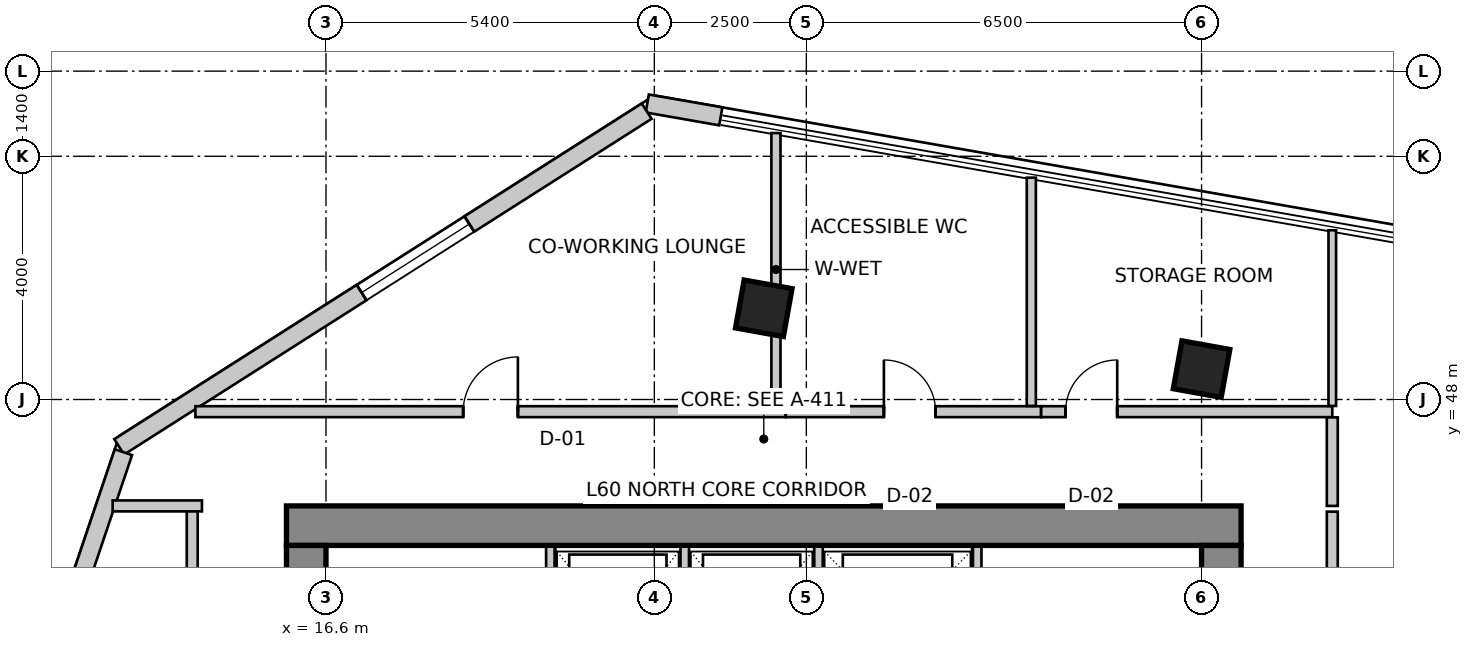
"""IFC4 building model, lengths in metres.
Left out: names, types, materials, properties, quantities, classifications, styles, units other than length and angle.
Written with IfcOpenShell. Run it as: python <this file> out.ifc"""

import sys

from ifc_helpers import new_model, si_unit, direction, frame, frame_2d, origin, origin_2d, place, context, subcontext, project, spatial, rectangle, extrude, source, transform, mapped, element, fill, save


model = new_model("IFC4")
c1 = context("Model", 3, precision=1e-05, world=origin(), true_north=direction((0.0, 1.0)))
c2 = subcontext(c1, "Body", "Model", "MODEL_VIEW")
j1 = project(units=[si_unit("LENGTHUNIT", "METRE"), si_unit("PLANEANGLEUNIT", "RADIAN")], contexts=[c1])
p1 = place(None, origin())
s1 = spatial("IfcSite", under=j1, at=p1, CompositionType="ELEMENT")
p2 = place(p1, origin())
s2 = spatial("IfcBuilding", under=s1, at=p2, CompositionType="ELEMENT")
p3 = place(p2, frame((0.0, 0.0, 235.9)))
s3 = spatial("IfcBuildingStorey", under=s2, at=p3, CompositionType="ELEMENT", Elevation=235.9)
p4 = place(p3, frame((15.95, 45.925, 0.0), z_axis=(0.0, 0.0, 1.0), x_axis=(1.0, 0.0, 0.0)))
e1 = element("IfcWall", 1, at=p4, inside=s3, PredefinedType="SHEAR", context=c2, shape_type="SweptSolid", body=[
    extrude(rectangle(XDim=15.7, YDim=0.65, at=frame_2d((7.85, 0.0))), origin(), (0.0, 0.0, 1.0), 3.5),
])
p5 = place(p3, frame((16.275, 34.2, 0.0), z_axis=(0.0, 0.0, 1.0), x_axis=(0.0, 1.0, 0.0)))
e2 = element("IfcWall", 2, at=p5, inside=s3, PredefinedType="SHEAR", context=c2, shape_type="SweptSolid", body=[
    extrude(rectangle(XDim=11.4, YDim=0.65, at=frame_2d((5.7, 0.0))), origin(), (0.0, 0.0, 1.0), 3.5),
])
m1 = source(origin(), c2, "Body", "SweptSolid", [
    extrude(rectangle(XDim=1.1, YDim=2.15, at=frame_2d((0.55, 1.075))), frame((0.0, 0.335, 0.0), z_axis=(0.0, -1.0, 0.0), x_axis=(1.0, 0.0, 0.0)), (0.0, 0.0, 1.0), 0.67),
])
p6 = place(p5, frame((7.15, 0.0, 0.0)))
e3 = element("IfcOpeningElement", 3, at=p6, cuts=e2, PredefinedType="OPENING", context=c2, shape_type="MappedRepresentation", body=[
    mapped(m1, transform((0.0, 0.0, 0.0), scale=1.0)),
])
p7 = place(p3, frame((31.325, 34.2, 0.0), z_axis=(0.0, 0.0, 1.0), x_axis=(0.0, 1.0, 0.0)))
e4 = element("IfcWall", 4, at=p7, inside=s3, PredefinedType="SHEAR", context=c2, shape_type="SweptSolid", body=[
    extrude(rectangle(XDim=11.4, YDim=0.65, at=frame_2d((5.7, 0.0))), origin(), (0.0, 0.0, 1.0), 3.5),
])
p8 = place(p7, frame((7.35, 0.0, 0.0)))
e5 = element("IfcOpeningElement", 5, at=p8, cuts=e4, PredefinedType="OPENING", context=c2, shape_type="MappedRepresentation", body=[
    mapped(m1, transform((0.0, 0.0, 0.0), scale=1.0)),
])
m2 = source(origin(), c2, "Body", "SweptSolid", [
    extrude(rectangle(XDim=0.8, YDim=0.8, at=origin_2d()), origin(), (0.0, 0.0, 1.0), 3.5),
])
for number, where, z_axis, x_axis in (
    (6, (23.8, 49.5, 0.0), (0.0, 0.0, 1.0), (0.984, -0.177, 0.0)),
    (7, (31.0, 48.5, 0.0), (0.0, 0.0, 1.0), (0.984, -0.177, 0.0)),
):
    element("IfcColumn", number, at=place(p3, frame(where, z_axis=z_axis, x_axis=x_axis)), inside=s3, PredefinedType="COLUMN", context=c2, shape_type="MappedRepresentation", body=[
        mapped(m2, transform((0.0, 0.0, 0.0), scale=1.0)),
    ])
p9 = place(p3, frame((23.093, 52.657, 0.0), z_axis=(0.0, 0.0, 1.0), x_axis=(-0.985090351288, 0.172037785961, 0.0)))
e8 = element("IfcWall", 8, at=p9, inside=s3, PredefinedType="SOLIDWALL", context=c2, shape_type="SweptSolid", body=[
    extrude(rectangle(XDim=1.228, YDim=0.3, at=frame_2d((0.614, 0.0))), origin(), (0.0, 0.0, 1.0), 3.25),
])
p10 = place(p3, frame((21.874, 52.742, 0.0), z_axis=(0.0, 0.0, 1.0), x_axis=(-0.84365659959, -0.536883173482, 0.0)))
e9 = element("IfcWall", 9, at=p10, inside=s3, PredefinedType="SOLIDWALL", context=c2, shape_type="SweptSolid", body=[
    extrude(rectangle(XDim=10.283, YDim=0.3, at=frame_2d((5.142, 0.0))), origin(), (0.0, 0.0, 1.0), 3.25),
])
m3 = source(origin(), c2, "Body", "SweptSolid", [
    extrude(rectangle(XDim=2.1, YDim=2.0, at=frame_2d((1.05, 1.0))), frame((0.0, 0.16, 0.0), z_axis=(0.0, -1.0, 0.0), x_axis=(1.0, 0.0, 0.0)), (0.0, 0.0, 1.0), 0.32),
])
p11 = place(p10, frame((3.457, 0.0, 0.85)))
e10 = element("IfcOpeningElement", 10, at=p11, cuts=e9, PredefinedType="OPENING", context=c2, shape_type="MappedRepresentation", body=[
    mapped(m3, transform((0.0, 0.0, 0.0), scale=1.0)),
])
p12 = place(p3, frame((13.269, 47.134, 0.0), z_axis=(0.0, 0.0, 1.0), x_axis=(-0.319920776449, -0.947444297464, 0.0)))
e11 = element("IfcWall", 11, at=p12, inside=s3, PredefinedType="SOLIDWALL", context=c2, shape_type="SweptSolid", body=[
    extrude(rectangle(XDim=16.133, YDim=0.3, at=frame_2d((8.067, 0.0))), origin(), (0.0, 0.0, 1.0), 3.25),
])
m4 = source(origin(), c2, "Body", "SweptSolid", [
    extrude(rectangle(XDim=2.4, YDim=2.2, at=frame_2d((1.2, 1.1))), frame((0.0, 0.16, 0.0), z_axis=(0.0, -1.0, 0.0), x_axis=(1.0, 0.0, 0.0)), (0.0, 0.0, 1.0), 0.32),
])
p13 = place(p12, frame((2.363, 0.0, 0.85)))
e12 = element("IfcOpeningElement", 12, at=p13, cuts=e11, PredefinedType="OPENING", context=c2, shape_type="MappedRepresentation", body=[
    mapped(m4, transform((0.0, 0.0, 0.0), scale=1.0)),
])
p14 = place(p12, frame((7.41, 0.0, 0.85)))
e13 = element("IfcOpeningElement", 13, at=p14, cuts=e11, PredefinedType="OPENING", context=c2, shape_type="MappedRepresentation", body=[
    mapped(m3, transform((0.0, 0.0, 0.0), scale=1.0)),
])
p15 = place(p12, frame((12.157, 0.0, 0.85)))
e14 = element("IfcOpeningElement", 14, at=p15, cuts=e11, PredefinedType="OPENING", context=c2, shape_type="MappedRepresentation", body=[
    mapped(m4, transform((0.0, 0.0, 0.0), scale=1.0)),
])
for number, where, z_axis, x_axis in (
    (15, (20.29, 43.28, 0.0), (0.0, 0.0, 1.0), (0.0, 1.0, 0.0)),
    (16, (27.31, 43.28, 0.0), (0.0, 0.0, 1.0), (0.0, 1.0, 0.0)),
):
    element("IfcWall", number, at=place(p3, frame(where, z_axis=z_axis, x_axis=x_axis)), inside=s3, PredefinedType="SOLIDWALL", context=c2, shape_type="SweptSolid", body=[
        extrude(rectangle(XDim=2.3, YDim=0.14, at=frame_2d((1.15, 0.0))), origin(), (0.0, 0.0, 1.0), 3.25),
    ])
for number, where, z_axis, x_axis in (
    (17, (22.5, 43.02, 0.0), (0.0, 0.0, 1.0), (0.0, 1.0, 0.0)),
    (18, (24.7, 43.02, 0.0), (0.0, 0.0, 1.0), (0.0, 1.0, 0.0)),
):
    element("IfcWall", number, at=place(p3, frame(where, z_axis=z_axis, x_axis=x_axis)), inside=s3, PredefinedType="SOLIDWALL", context=c2, shape_type="SweptSolid", body=[
        extrude(rectangle(XDim=2.56, YDim=0.14, at=frame_2d((1.28, 0.0))), origin(), (0.0, 0.0, 1.0), 3.25),
    ])
p16 = place(p3, frame((14.4, 33.644, 0.0), z_axis=(0.0, 0.0, 1.0), x_axis=(0.0, 1.0, 0.0)))
e19 = element("IfcWall", 19, at=p16, inside=s3, PredefinedType="PARTITIONING", context=c2, shape_type="SweptSolid", body=[
    extrude(rectangle(XDim=12.606, YDim=0.18, at=frame_2d((6.303, 0.0))), origin(), (0.0, 0.0, 1.0), 3.25),
])
m5 = source(origin(), c2, "Body", "SweptSolid", [
    extrude(rectangle(XDim=0.9, YDim=2.15, at=frame_2d((0.45, 1.075))), frame((0.0, 0.1, 0.0), z_axis=(0.0, -1.0, 0.0), x_axis=(1.0, 0.0, 0.0)), (0.0, 0.0, 1.0), 0.2),
])
p17 = place(p16, frame((4.399, 0.0, 0.0)))
e20 = element("IfcOpeningElement", 20, at=p17, cuts=e19, PredefinedType="OPENING", context=c2, shape_type="MappedRepresentation", body=[
    mapped(m5, transform((0.0, 0.0, 0.0), scale=1.0)),
])
p18 = place(p3, frame((14.56, 46.25, 0.0), z_axis=(0.0, 0.0, 1.0), x_axis=(-1.0, 0.0, 0.0)))
e21 = element("IfcWall", 21, at=p18, inside=s3, PredefinedType="PARTITIONING", context=c2, shape_type="SweptSolid", body=[
    extrude(rectangle(XDim=1.469, YDim=0.18, at=frame_2d((0.734, 0.0))), origin(), (0.0, 0.0, 1.0), 3.25),
])
p19 = place(p3, frame((14.453, 47.8, 0.0), z_axis=(0.0, 0.0, 1.0), x_axis=(1.0, 0.0, 0.0)))
e22 = element("IfcWall", 22, at=p19, inside=s3, PredefinedType="PARTITIONING", context=c2, shape_type="SweptSolid", body=[
    extrude(rectangle(XDim=9.707, YDim=0.18, at=frame_2d((4.854, 0.0))), origin(), (0.0, 0.0, 1.0), 2.835),
])
p20 = place(p19, frame((4.404, 0.0, 0.0)))
e23 = element("IfcOpeningElement", 23, at=p20, cuts=e22, PredefinedType="OPENING", context=c2, shape_type="MappedRepresentation", body=[
    mapped(m5, transform((0.0, 0.0, 0.0), scale=1.0)),
])
p21 = place(p3, frame((24.162, 47.8, 0.0), z_axis=(0.0, 0.0, 1.0), x_axis=(1.0, 0.0, 0.0)))
e24 = element("IfcWall", 24, at=p21, inside=s3, PredefinedType="PARTITIONING", context=c2, shape_type="SweptSolid", body=[
    extrude(rectangle(XDim=4.198, YDim=0.18, at=frame_2d((2.099, 0.0))), origin(), (0.0, 0.0, 1.0), 3.25),
])
m6 = source(origin(), c2, "Body", "SweptSolid", [
    extrude(rectangle(XDim=0.85, YDim=2.15, at=frame_2d((0.425, 1.075))), frame((0.0, 0.1, 0.0), z_axis=(0.0, -1.0, 0.0), x_axis=(1.0, 0.0, 0.0)), (0.0, 0.0, 1.0), 0.2),
])
p22 = place(p21, frame((1.613, 0.0, 0.0)))
e25 = element("IfcOpeningElement", 25, at=p22, cuts=e24, PredefinedType="OPENING", context=c2, shape_type="MappedRepresentation", body=[
    mapped(m6, transform((0.0, 0.0, 0.0), scale=1.0)),
])
p23 = place(p3, frame((28.362, 47.8, 0.0), z_axis=(0.0, 0.0, 1.0), x_axis=(1.0, 0.0, 0.0)))
e26 = element("IfcWall", 26, at=p23, inside=s3, PredefinedType="PARTITIONING", context=c2, shape_type="SweptSolid", body=[
    extrude(rectangle(XDim=4.788, YDim=0.18, at=frame_2d((2.394, 0.0))), origin(), (0.0, 0.0, 1.0), 2.688),
])
p24 = place(p23, frame((0.401, 0.0, 0.0)))
e27 = element("IfcOpeningElement", 27, at=p24, cuts=e26, PredefinedType="OPENING", context=c2, shape_type="MappedRepresentation", body=[
    mapped(m6, transform((0.0, 0.0, 0.0), scale=1.0)),
])
p25 = place(p3, frame((33.15, 47.706, 0.0), z_axis=(0.0, 0.0, 1.0), x_axis=(0.0, -1.0, 0.0)))
e28 = element("IfcWall", 28, at=p25, inside=s3, PredefinedType="PARTITIONING", context=c2, shape_type="SweptSolid", body=[
    extrude(rectangle(XDim=1.456, YDim=0.18, at=frame_2d((0.728, 0.0))), origin(), (0.0, 0.0, 1.0), 2.835),
])
p26 = place(p3, frame((33.15, 46.156, 0.0), z_axis=(0.0, 0.0, 1.0), x_axis=(0.0, -1.0, 0.0)))
e29 = element("IfcWall", 29, at=p26, inside=s3, PredefinedType="PARTITIONING", context=c2, shape_type="SweptSolid", body=[
    extrude(rectangle(XDim=6.316, YDim=0.18, at=frame_2d((3.158, 0.0))), origin(), (0.0, 0.0, 1.0), 2.688),
])
p27 = place(p3, frame((24.0, 52.382, 0.0), z_axis=(0.0, 0.0, 1.0), x_axis=(0.0, -1.0, 0.0)))
e30 = element("IfcWall", 30, at=p27, inside=s3, PredefinedType="PARTITIONING", context=c2, shape_type="SweptSolid", body=[
    extrude(rectangle(XDim=4.488, YDim=0.15, at=frame_2d((2.244, 0.0))), origin(), (0.0, 0.0, 1.0), 2.542),
])
p28 = place(p3, frame((28.2, 51.648, 0.0), z_axis=(0.0, 0.0, 1.0), x_axis=(0.0, -1.0, 0.0)))
e31 = element("IfcWall", 31, at=p28, inside=s3, PredefinedType="PARTITIONING", context=c2, shape_type="SweptSolid", body=[
    extrude(rectangle(XDim=3.754, YDim=0.15, at=frame_2d((1.877, 0.0))), origin(), (0.0, 0.0, 1.0), 2.542),
])
p29 = place(p3, frame((33.15, 50.783, 0.0), z_axis=(0.0, 0.0, 1.0), x_axis=(0.0, -1.0, 0.0)))
e32 = element("IfcWall", 32, at=p29, inside=s3, PredefinedType="PARTITIONING", context=c2, shape_type="SweptSolid", body=[
    extrude(rectangle(XDim=2.889, YDim=0.125, at=frame_2d((1.445, 0.0))), origin(), (0.0, 0.0, 1.0), 2.542),
])
m7 = source(origin(), c2, "Body", "SweptSolid", [
    extrude(rectangle(XDim=2.1, YDim=2.0, at=frame_2d((1.05, 1.0))), frame((0.0, -0.015, 0.0), z_axis=(0.0, -1.0, 0.0), x_axis=(1.0, 0.0, 0.0)), (0.0, 0.0, 1.0), 0.06),
])
p30 = place(p11, origin())
e33 = element("IfcWindow", 33, at=p30, inside=s3, PartitioningType="SINGLE_PANEL", PredefinedType="WINDOW", context=c2, shape_type="MappedRepresentation", body=[
    mapped(m7, transform((0.0, 0.0, 0.0), scale=1.0)),
])
fill(e10, e33)
m8 = source(origin(), c2, "Body", "SweptSolid", [
    extrude(rectangle(XDim=0.9, YDim=2.15, at=frame_2d((0.45, 1.075))), frame((0.0, 0.025, 0.0), z_axis=(0.0, -1.0, 0.0), x_axis=(1.0, 0.0, 0.0)), (0.0, 0.0, 1.0), 0.05),
])
p31 = place(p20, origin())
e34 = element("IfcDoor", 34, at=p31, inside=s3, OperationType="SINGLE_SWING_RIGHT", PredefinedType="DOOR", context=c2, shape_type="MappedRepresentation", body=[
    mapped(m8, transform((0.0, 0.0, 0.0), scale=1.0)),
])
fill(e23, e34)
m9 = source(origin(), c2, "Body", "SweptSolid", [
    extrude(rectangle(XDim=0.85, YDim=2.15, at=frame_2d((0.425, 1.075))), frame((0.0, 0.025, 0.0), z_axis=(0.0, -1.0, 0.0), x_axis=(1.0, 0.0, 0.0)), (0.0, 0.0, 1.0), 0.05),
])
p32 = place(p22, origin())
e35 = element("IfcDoor", 35, at=p32, inside=s3, OperationType="SINGLE_SWING_LEFT", PredefinedType="DOOR", context=c2, shape_type="MappedRepresentation", body=[
    mapped(m9, transform((0.0, 0.0, 0.0), scale=1.0)),
])
fill(e25, e35)
p33 = place(p24, origin())
e36 = element("IfcDoor", 36, at=p33, inside=s3, OperationType="SINGLE_SWING_RIGHT", PredefinedType="DOOR", context=c2, shape_type="MappedRepresentation", body=[
    mapped(m9, transform((0.0, 0.0, 0.0), scale=1.0)),
])
fill(e27, e36)
save(model, sys.argv[1])
